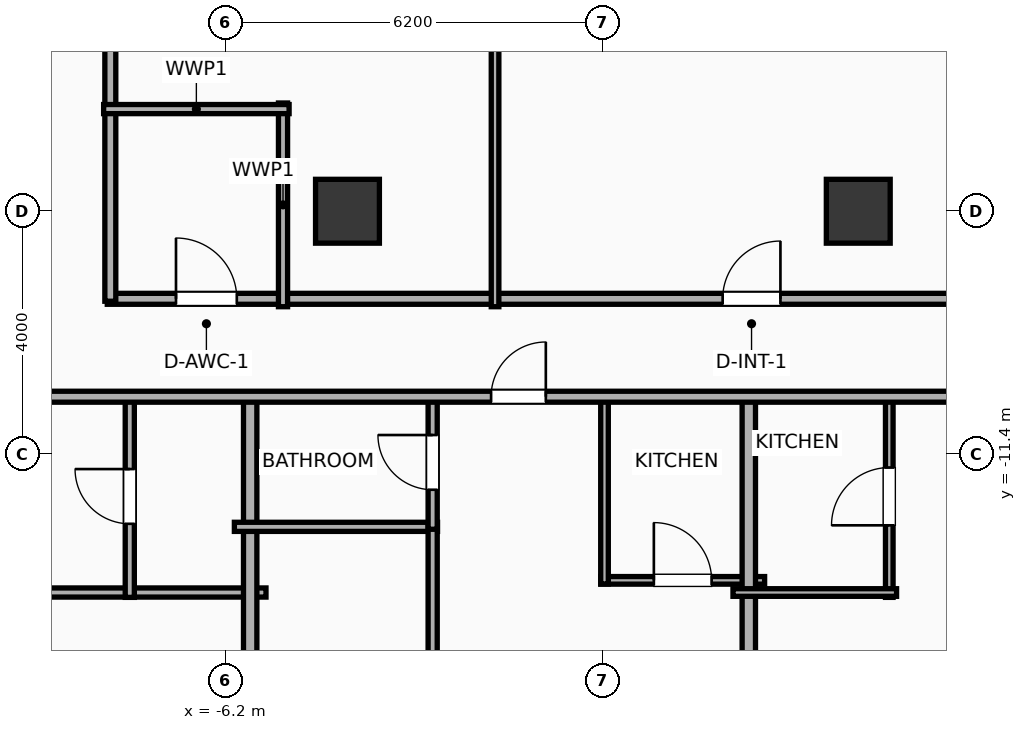
"""IFC4 building model, lengths in metres.
Left out: names, types, materials, properties, quantities, classifications, styles, units other than length and angle.
Written with IfcOpenShell. Run it as: python <this file> out.ifc"""

import sys

from ifc_helpers import new_model, si_unit, direction, frame, frame_2d, origin, origin_2d, place, context, subcontext, project, spatial, rectangle, extrude, element, fill, save


model = new_model("IFC4")
c1 = context("Model", 3, precision=1e-05, world=origin(), true_north=direction((0.0, 1.0)))
c2 = subcontext(c1, "Body", "Model", "MODEL_VIEW")
j1 = project(units=[si_unit("LENGTHUNIT", "METRE"), si_unit("PLANEANGLEUNIT", "RADIAN")], contexts=[c1])
p1 = place(None, origin())
s1 = spatial("IfcSite", under=j1, at=p1, CompositionType="ELEMENT")
p2 = place(p1, origin())
s2 = spatial("IfcBuilding", under=s1, at=p2, CompositionType="ELEMENT")
p3 = place(p2, frame((0.0, 0.0, 72.8)))
s3 = spatial("IfcBuildingStorey", under=s2, at=p3, CompositionType="ELEMENT", Elevation=72.8)
for number, where, z_axis, x_axis in (
    (1, (-4.2, -7.4, 0.0), (0.0, 0.0, 1.0), (1.0, 0.0, 0.0)),
    (2, (4.2, -7.4, 0.0), (0.0, 0.0, 1.0), (1.0, 0.0, 0.0)),
):
    element("IfcColumn", number, at=place(p3, frame(where, z_axis=z_axis, x_axis=x_axis)), inside=s3, PredefinedType="COLUMN", context=c2, shape_type="SweptSolid", body=[
        extrude(rectangle(XDim=1.05, YDim=1.05, at=origin_2d()), origin(), (0.0, 0.0, 1.0), 3.9),
    ])
p4 = place(p3, frame((-8.15, -8.84, 0.0), z_axis=(0.0, 0.0, 1.0), x_axis=(1.0, 0.0, 0.0)))
e3 = element("IfcWall", 3, at=p4, inside=s3, PredefinedType="PARTITIONING", context=c2, shape_type="SweptSolid", body=[
    extrude(rectangle(XDim=16.3, YDim=0.18, at=frame_2d((8.15, 0.0))), origin(), (0.0, 0.0, 1.0), 3.65),
])
p5 = place(p4, frame((1.13, 0.0, 0.0)))
e4 = element("IfcOpeningElement", 4, at=p5, cuts=e3, PredefinedType="OPENING", context=c2, shape_type="SweptSolid", body=[
    extrude(rectangle(XDim=1.0, YDim=2.05, at=frame_2d((0.5, 1.025))), frame((0.0, 0.1, 0.0), z_axis=(0.0, -1.0, 0.0), x_axis=(1.0, 0.0, 0.0)), (0.0, 0.0, 1.0), 0.2),
])
p6 = place(p4, frame((10.12, 0.0, 0.0)))
e5 = element("IfcOpeningElement", 5, at=p6, cuts=e3, PredefinedType="OPENING", context=c2, shape_type="SweptSolid", body=[
    extrude(rectangle(XDim=0.95, YDim=2.05, at=frame_2d((0.475, 1.025))), frame((0.0, 0.1, 0.0), z_axis=(0.0, -1.0, 0.0), x_axis=(1.0, 0.0, 0.0)), (0.0, 0.0, 1.0), 0.2),
])
p7 = place(p3, frame((-8.1, -8.88, 0.0), z_axis=(0.0, 0.0, 1.0), x_axis=(0.0, 1.0, 0.0)))
e6 = element("IfcWall", 6, at=p7, inside=s3, PredefinedType="PARTITIONING", context=c2, shape_type="SweptSolid", body=[
    extrude(rectangle(XDim=17.76, YDim=0.18, at=frame_2d((8.88, 0.0))), origin(), (0.0, 0.0, 1.0), 3.65),
])
p8 = place(p3, frame((-5.26, -8.97, 0.0), z_axis=(0.0, 0.0, 1.0), x_axis=(0.0, 1.0, 0.0)))
e7 = element("IfcWall", 7, at=p8, inside=s3, PredefinedType="PLUMBINGWALL", context=c2, shape_type="SweptSolid", body=[
    extrude(rectangle(XDim=3.35, YDim=0.15, at=frame_2d((1.675, 0.0))), origin(), (0.0, 0.0, 1.0), 3.65),
])
p9 = place(p3, frame((-8.21, -5.72, 0.0), z_axis=(0.0, 0.0, 1.0), x_axis=(1.0, 0.0, 0.0)))
e8 = element("IfcWall", 8, at=p9, inside=s3, PredefinedType="PLUMBINGWALL", context=c2, shape_type="SweptSolid", body=[
    extrude(rectangle(XDim=3.05, YDim=0.15, at=frame_2d((1.525, 0.0))), origin(), (0.0, 0.0, 1.0), 3.65),
])
p10 = place(p3, frame((-1.773, -8.97, 0.0), z_axis=(0.0, 0.0, 1.0), x_axis=(0.0, 1.0, 0.0)))
e9 = element("IfcWall", 9, at=p10, inside=s3, PredefinedType="PARTITIONING", context=c2, shape_type="SweptSolid", body=[
    extrude(rectangle(XDim=17.94, YDim=0.125, at=frame_2d((8.97, 0.0))), origin(), (0.0, 0.0, 1.0), 3.65),
])
p11 = place(p10, frame((8.495, 0.0, 0.0)))
e10 = element("IfcOpeningElement", 10, at=p11, cuts=e9, PredefinedType="OPENING", context=c2, shape_type="SweptSolid", body=[
    extrude(rectangle(XDim=0.95, YDim=2.05, at=frame_2d((0.475, 1.025))), frame((0.0, 0.073, 0.0), z_axis=(0.0, -1.0, 0.0), x_axis=(1.0, 0.0, 0.0)), (0.0, 0.0, 1.0), 0.145),
])
p12 = place(p3, frame((-9.33, -13.67, 0.0), z_axis=(0.0, 0.0, 1.0), x_axis=(1.0, 0.0, 0.0)))
e11 = element("IfcWall", 11, at=p12, inside=s3, PredefinedType="PLUMBINGWALL", context=c2, shape_type="SweptSolid", body=[
    extrude(rectangle(XDim=3.79, YDim=0.15, at=frame_2d((1.895, 0.0))), origin(), (0.0, 0.0, 1.0), 3.65),
])
p13 = place(p3, frame((-7.78, -13.75, 0.0), z_axis=(0.0, 0.0, 1.0), x_axis=(0.0, 1.0, 0.0)))
e12 = element("IfcWall", 12, at=p13, inside=s3, PredefinedType="PLUMBINGWALL", context=c2, shape_type="SweptSolid", body=[
    extrude(rectangle(XDim=3.32, YDim=0.15, at=frame_2d((1.66, 0.0))), origin(), (0.0, 0.0, 1.0), 3.65),
])
p14 = place(p13, frame((1.21, 0.0, 0.0)))
e13 = element("IfcOpeningElement", 13, at=p14, cuts=e12, PredefinedType="OPENING", context=c2, shape_type="SweptSolid", body=[
    extrude(rectangle(XDim=0.9, YDim=2.05, at=frame_2d((0.45, 1.025))), frame((0.0, 0.085, 0.0), z_axis=(0.0, -1.0, 0.0), x_axis=(1.0, 0.0, 0.0)), (0.0, 0.0, 1.0), 0.17),
])
p15 = place(p3, frame((-5.8, -22.21, 0.0), z_axis=(0.0, 0.0, 1.0), x_axis=(0.0, 1.0, 0.0)))
e14 = element("IfcWall", 14, at=p15, inside=s3, PredefinedType="PARTITIONING", context=c2, shape_type="SweptSolid", body=[
    extrude(rectangle(XDim=11.84, YDim=0.22, at=frame_2d((5.92, 0.0))), origin(), (0.0, 0.0, 1.0), 3.65),
])
p16 = place(p3, frame((-6.06, -12.59, 0.0), z_axis=(0.0, 0.0, 1.0), x_axis=(1.0, 0.0, 0.0)))
e15 = element("IfcWall", 15, at=p16, inside=s3, PredefinedType="PLUMBINGWALL", context=c2, shape_type="SweptSolid", body=[
    extrude(rectangle(XDim=3.341, YDim=0.15, at=frame_2d((1.67, 0.0))), origin(), (0.0, 0.0, 1.0), 3.65),
])
p17 = place(p3, frame((-2.799, -22.258, 0.0), z_axis=(0.0, 0.0, 1.0), x_axis=(0.0, 1.0, 0.0)))
e16 = element("IfcWall", 16, at=p17, inside=s3, PredefinedType="PLUMBINGWALL", context=c2, shape_type="SweptSolid", body=[
    extrude(rectangle(XDim=9.708, YDim=0.15, at=frame_2d((4.854, 0.0))), origin(), (0.0, 0.0, 1.0), 3.65),
])
p18 = place(p17, frame((6.54, 0.0, 0.0)))
e17 = element("IfcOpeningElement", 17, at=p18, cuts=e16, PredefinedType="OPENING", context=c2, shape_type="SweptSolid", body=[
    extrude(rectangle(XDim=0.9, YDim=2.05, at=frame_2d((0.45, 1.025))), frame((0.0, 0.085, 0.0), z_axis=(0.0, -1.0, 0.0), x_axis=(1.0, 0.0, 0.0)), (0.0, 0.0, 1.0), 0.17),
])
p19 = place(p3, frame((-2.799, -12.63, 0.0), z_axis=(0.0, 0.0, 1.0), x_axis=(0.0, 1.0, 0.0)))
e18 = element("IfcWall", 18, at=p19, inside=s3, PredefinedType="PLUMBINGWALL", context=c2, shape_type="SweptSolid", body=[
    extrude(rectangle(XDim=2.2, YDim=0.15, at=frame_2d((1.1, 0.0))), origin(), (0.0, 0.0, 1.0), 3.65),
])
p20 = place(p19, frame((0.65, 0.0, 0.0)))
e19 = element("IfcOpeningElement", 19, at=p20, cuts=e18, PredefinedType="OPENING", context=c2, shape_type="SweptSolid", body=[
    extrude(rectangle(XDim=0.9, YDim=2.05, at=frame_2d((0.45, 1.025))), frame((0.0, 0.085, 0.0), z_axis=(0.0, -1.0, 0.0), x_axis=(1.0, 0.0, 0.0)), (0.0, 0.0, 1.0), 0.17),
])
p21 = place(p3, frame((-0.033, -13.47, 0.0), z_axis=(0.0, 0.0, 1.0), x_axis=(1.0, 0.0, 0.0)))
e20 = element("IfcWall", 20, at=p21, inside=s3, PredefinedType="PARTITIONING", context=c2, shape_type="SweptSolid", body=[
    extrude(rectangle(XDim=2.693, YDim=0.125, at=frame_2d((1.346, 0.0))), origin(), (0.0, 0.0, 1.0), 3.65),
])
p22 = place(p21, frame((0.872, 0.0, 0.0)))
e21 = element("IfcOpeningElement", 21, at=p22, cuts=e20, PredefinedType="OPENING", context=c2, shape_type="SweptSolid", body=[
    extrude(rectangle(XDim=0.95, YDim=2.05, at=frame_2d((0.475, 1.025))), frame((0.0, 0.073, 0.0), z_axis=(0.0, -1.0, 0.0), x_axis=(1.0, 0.0, 0.0)), (0.0, 0.0, 1.0), 0.145),
])
p23 = place(p3, frame((0.027, -13.53, 0.0), z_axis=(0.0, 0.0, 1.0), x_axis=(0.0, 1.0, 0.0)))
e22 = element("IfcWall", 22, at=p23, inside=s3, PredefinedType="PARTITIONING", context=c2, shape_type="SweptSolid", body=[
    extrude(rectangle(XDim=3.1, YDim=0.125, at=frame_2d((1.55, 0.0))), origin(), (0.0, 0.0, 1.0), 3.65),
])
p24 = place(p3, frame((2.4, -22.21, 0.0), z_axis=(0.0, 0.0, 1.0), x_axis=(0.0, 1.0, 0.0)))
e23 = element("IfcWall", 23, at=p24, inside=s3, PredefinedType="PARTITIONING", context=c2, shape_type="SweptSolid", body=[
    extrude(rectangle(XDim=11.84, YDim=0.22, at=frame_2d((5.92, 0.0))), origin(), (0.0, 0.0, 1.0), 2.94),
])
p25 = place(p3, frame((4.71, -13.75, 0.0), z_axis=(0.0, 0.0, 1.0), x_axis=(0.0, 1.0, 0.0)))
e24 = element("IfcWall", 24, at=p25, inside=s3, PredefinedType="PARTITIONING", context=c2, shape_type="SweptSolid", body=[
    extrude(rectangle(XDim=3.32, YDim=0.125, at=frame_2d((1.66, 0.0))), origin(), (0.0, 0.0, 1.0), 3.65),
])
p26 = place(p25, frame((1.185, 0.0, 0.0)))
e25 = element("IfcOpeningElement", 25, at=p26, cuts=e24, PredefinedType="OPENING", context=c2, shape_type="SweptSolid", body=[
    extrude(rectangle(XDim=0.95, YDim=2.05, at=frame_2d((0.475, 1.025))), frame((0.0, 0.073, 0.0), z_axis=(0.0, -1.0, 0.0), x_axis=(1.0, 0.0, 0.0)), (0.0, 0.0, 1.0), 0.145),
])
p27 = place(p3, frame((2.14, -13.67, 0.0), z_axis=(0.0, 0.0, 1.0), x_axis=(1.0, 0.0, 0.0)))
e26 = element("IfcWall", 26, at=p27, inside=s3, PredefinedType="PARTITIONING", context=c2, shape_type="SweptSolid", body=[
    extrude(rectangle(XDim=2.69, YDim=0.125, at=frame_2d((1.345, 0.0))), origin(), (0.0, 0.0, 1.0), 3.65),
])
p28 = place(p3, frame((-33.41, -10.45, 0.0), z_axis=(0.0, 0.0, 1.0), x_axis=(1.0, 0.0, 0.0)))
e27 = element("IfcWall", 27, at=p28, inside=s3, PredefinedType="PARTITIONING", context=c2, shape_type="SweptSolid", body=[
    extrude(rectangle(XDim=59.62, YDim=0.18, at=frame_2d((29.81, 0.0))), origin(), (0.0, 0.0, 1.0), 3.65),
])
p29 = place(p28, frame((2.495, 0.0, 0.0)))
e28 = element("IfcOpeningElement", 28, at=p29, cuts=e27, PredefinedType="OPENING", context=c2, shape_type="SweptSolid", body=[
    extrude(rectangle(XDim=0.9, YDim=2.05, at=frame_2d((0.45, 1.025))), frame((0.0, 0.1, 0.0), z_axis=(0.0, -1.0, 0.0), x_axis=(1.0, 0.0, 0.0)), (0.0, 0.0, 1.0), 0.2),
])
p30 = place(p28, frame((8.905, 0.0, 0.0)))
e29 = element("IfcOpeningElement", 29, at=p30, cuts=e27, PredefinedType="OPENING", context=c2, shape_type="SweptSolid", body=[
    extrude(rectangle(XDim=1.15, YDim=2.05, at=frame_2d((0.575, 1.025))), frame((0.0, 0.1, 0.0), z_axis=(0.0, -1.0, 0.0), x_axis=(1.0, 0.0, 0.0)), (0.0, 0.0, 1.0), 0.2),
])
p31 = place(p28, frame((14.902, 0.0, 0.0)))
e30 = element("IfcOpeningElement", 30, at=p31, cuts=e27, PredefinedType="OPENING", context=c2, shape_type="SweptSolid", body=[
    extrude(rectangle(XDim=1.15, YDim=2.05, at=frame_2d((0.575, 1.025))), frame((0.0, 0.1, 0.0), z_axis=(0.0, -1.0, 0.0), x_axis=(1.0, 0.0, 0.0)), (0.0, 0.0, 1.0), 0.2),
])
p32 = place(p28, frame((23.112, 0.0, 0.0)))
e31 = element("IfcOpeningElement", 31, at=p32, cuts=e27, PredefinedType="OPENING", context=c2, shape_type="SweptSolid", body=[
    extrude(rectangle(XDim=1.15, YDim=2.05, at=frame_2d((0.575, 1.025))), frame((0.0, 0.1, 0.0), z_axis=(0.0, -1.0, 0.0), x_axis=(1.0, 0.0, 0.0)), (0.0, 0.0, 1.0), 0.2),
])
p33 = place(p28, frame((31.572, 0.0, 0.0)))
e32 = element("IfcOpeningElement", 32, at=p33, cuts=e27, PredefinedType="OPENING", context=c2, shape_type="SweptSolid", body=[
    extrude(rectangle(XDim=0.9, YDim=2.05, at=frame_2d((0.45, 1.025))), frame((0.0, 0.1, 0.0), z_axis=(0.0, -1.0, 0.0), x_axis=(1.0, 0.0, 0.0)), (0.0, 0.0, 1.0), 0.2),
])
p34 = place(p28, frame((39.502, 0.0, 0.0)))
e33 = element("IfcOpeningElement", 33, at=p34, cuts=e27, PredefinedType="OPENING", context=c2, shape_type="SweptSolid", body=[
    extrude(rectangle(XDim=1.15, YDim=2.05, at=frame_2d((0.575, 1.025))), frame((0.0, 0.1, 0.0), z_axis=(0.0, -1.0, 0.0), x_axis=(1.0, 0.0, 0.0)), (0.0, 0.0, 1.0), 0.2),
])
p35 = place(p28, frame((47.699, 0.0, 0.0)))
e34 = element("IfcOpeningElement", 34, at=p35, cuts=e27, PredefinedType="OPENING", context=c2, shape_type="SweptSolid", body=[
    extrude(rectangle(XDim=1.15, YDim=2.05, at=frame_2d((0.575, 1.025))), frame((0.0, 0.1, 0.0), z_axis=(0.0, -1.0, 0.0), x_axis=(1.0, 0.0, 0.0)), (0.0, 0.0, 1.0), 0.2),
])
p36 = place(p28, frame((55.539, 0.0, 0.0)))
e35 = element("IfcOpeningElement", 35, at=p36, cuts=e27, PredefinedType="OPENING", context=c2, shape_type="SweptSolid", body=[
    extrude(rectangle(XDim=1.15, YDim=2.05, at=frame_2d((0.575, 1.025))), frame((0.0, 0.1, 0.0), z_axis=(0.0, -1.0, 0.0), x_axis=(1.0, 0.0, 0.0)), (0.0, 0.0, 1.0), 0.2),
])
p37 = place(p5, origin())
e36 = element("IfcDoor", 36, at=p37, inside=s3, OperationType="SINGLE_SWING_LEFT", PredefinedType="DOOR", context=c2, shape_type="SweptSolid", body=[
    extrude(rectangle(XDim=1.0, YDim=2.05, at=frame_2d((0.5, 1.025))), frame((0.0, 0.025, 0.0), z_axis=(0.0, -1.0, 0.0), x_axis=(1.0, 0.0, 0.0)), (0.0, 0.0, 1.0), 0.05),
])
fill(e4, e36)
p38 = place(p6, origin())
e37 = element("IfcDoor", 37, at=p38, inside=s3, OperationType="SINGLE_SWING_RIGHT", PredefinedType="DOOR", context=c2, shape_type="SweptSolid", body=[
    extrude(rectangle(XDim=0.95, YDim=2.05, at=frame_2d((0.475, 1.025))), frame((0.0, 0.025, 0.0), z_axis=(0.0, -1.0, 0.0), x_axis=(1.0, 0.0, 0.0)), (0.0, 0.0, 1.0), 0.05),
])
fill(e5, e37)
p39 = place(p14, origin())
e38 = element("IfcDoor", 38, at=p39, inside=s3, OperationType="SINGLE_SWING_RIGHT", PredefinedType="DOOR", context=c2, shape_type="SweptSolid", body=[
    extrude(rectangle(XDim=0.9, YDim=2.05, at=frame_2d((0.45, 1.025))), frame((0.0, 0.025, 0.0), z_axis=(0.0, -1.0, 0.0), x_axis=(1.0, 0.0, 0.0)), (0.0, 0.0, 1.0), 0.05),
])
fill(e13, e38)
p40 = place(p20, origin())
e39 = element("IfcDoor", 39, at=p40, inside=s3, OperationType="SINGLE_SWING_RIGHT", PredefinedType="DOOR", context=c2, shape_type="SweptSolid", body=[
    extrude(rectangle(XDim=0.9, YDim=2.05, at=frame_2d((0.45, 1.025))), frame((0.0, 0.025, 0.0), z_axis=(0.0, -1.0, 0.0), x_axis=(1.0, 0.0, 0.0)), (0.0, 0.0, 1.0), 0.05),
])
fill(e19, e39)
p41 = place(p22, origin())
e40 = element("IfcDoor", 40, at=p41, inside=s3, OperationType="SINGLE_SWING_LEFT", PredefinedType="DOOR", context=c2, shape_type="SweptSolid", body=[
    extrude(rectangle(XDim=0.95, YDim=2.05, at=frame_2d((0.475, 1.025))), frame((0.0, 0.025, 0.0), z_axis=(0.0, -1.0, 0.0), x_axis=(1.0, 0.0, 0.0)), (0.0, 0.0, 1.0), 0.05),
])
fill(e21, e40)
p42 = place(p26, origin())
e41 = element("IfcDoor", 41, at=p42, inside=s3, OperationType="SINGLE_SWING_LEFT", PredefinedType="DOOR", context=c2, shape_type="SweptSolid", body=[
    extrude(rectangle(XDim=0.95, YDim=2.05, at=frame_2d((0.475, 1.025))), frame((0.0, 0.025, 0.0), z_axis=(0.0, -1.0, 0.0), x_axis=(1.0, 0.0, 0.0)), (0.0, 0.0, 1.0), 0.05),
])
fill(e25, e41)
p43 = place(p33, origin())
e42 = element("IfcDoor", 42, at=p43, inside=s3, OperationType="SINGLE_SWING_RIGHT", PredefinedType="DOOR", context=c2, shape_type="SweptSolid", body=[
    extrude(rectangle(XDim=0.9, YDim=2.05, at=frame_2d((0.45, 1.025))), frame((0.0, 0.025, 0.0), z_axis=(0.0, -1.0, 0.0), x_axis=(1.0, 0.0, 0.0)), (0.0, 0.0, 1.0), 0.05),
])
fill(e32, e42)
save(model, sys.argv[1])
